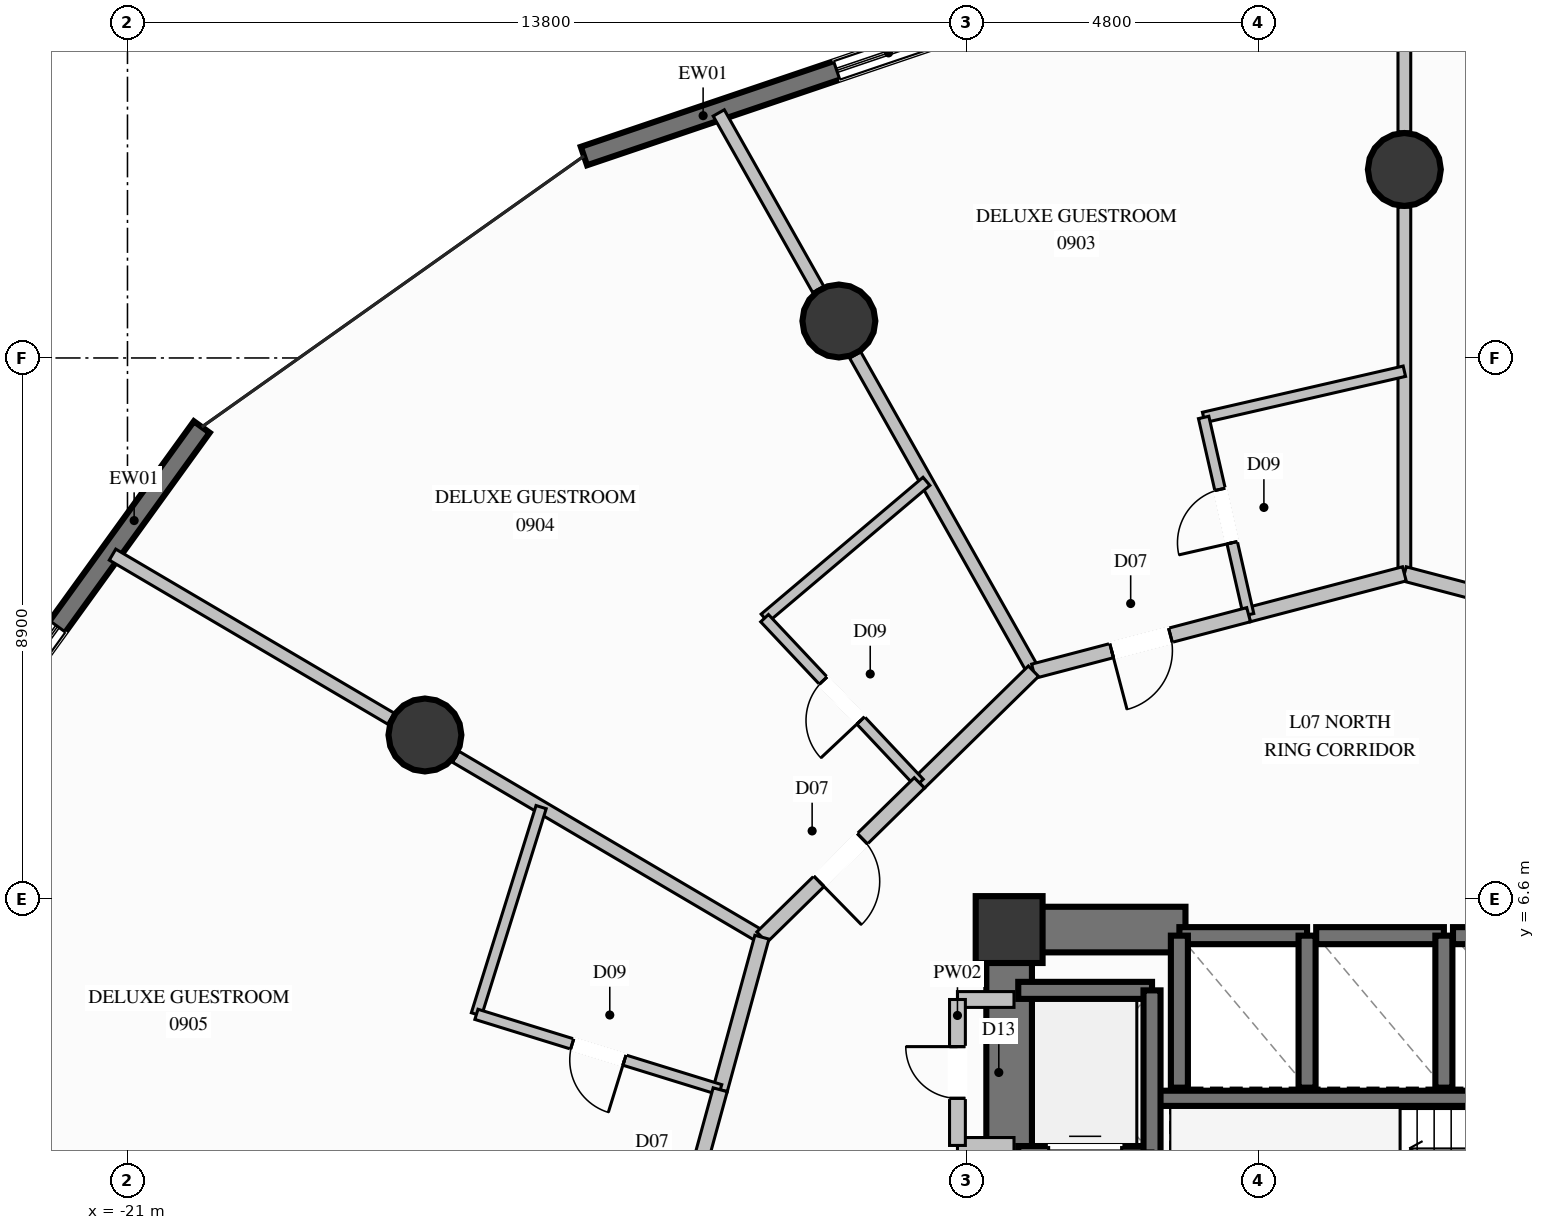
"""IFC4 building model, lengths in metres.
Left out: names, types, materials, properties, quantities, classifications, styles, units other than length and angle.
Written with IfcOpenShell. Run it as: python <this file> out.ifc"""

import sys

from ifc_helpers import new_model, si_unit, direction, frame, frame_2d, origin, origin_2d, place, context, subcontext, project, spatial, rectangle, circle, extrude, element, fill, save


model = new_model("IFC4")
c1 = context("Model", 3, precision=1e-05, world=origin(), true_north=direction((0.0, 1.0)))
c2 = subcontext(c1, "Body", "Model", "MODEL_VIEW")
j1 = project(units=[si_unit("LENGTHUNIT", "METRE"), si_unit("PLANEANGLEUNIT", "RADIAN")], contexts=[c1])
p1 = place(None, origin())
s1 = spatial("IfcSite", under=j1, at=p1, CompositionType="ELEMENT")
p2 = place(p1, origin())
s2 = spatial("IfcBuilding", under=s1, at=p2, CompositionType="ELEMENT")
p3 = place(p2, frame((0.0, 0.0, 35.6)))
s3 = spatial("IfcBuildingStorey", under=s2, at=p3, CompositionType="ELEMENT", Elevation=35.6)
p4 = place(p3, frame((-6.5, 6.1, 0.0), z_axis=(0.0, 0.0, 1.0), x_axis=(1.0, 0.0, 0.0)))
e1 = element("IfcColumn", 1, at=p4, inside=s3, PredefinedType="COLUMN", context=c2, shape_type="SweptSolid", body=[
    extrude(rectangle(XDim=1.1, YDim=1.1, at=origin_2d()), origin(), (0.0, 0.0, 1.0), 3.6),
])
p5 = place(p3, frame((-4.13, 3.325, 0.0), z_axis=(0.0, 0.0, 1.0), x_axis=(1.0, 0.0, 0.0)))
e2 = element("IfcWall", 2, at=p5, inside=s3, PredefinedType="SOLIDWALL", context=c2, shape_type="SweptSolid", body=[
    extrude(rectangle(XDim=8.26, YDim=0.25, at=frame_2d((4.13, 0.0))), origin(), (0.0, 0.0, 1.0), 3.6),
])
p6 = place(p3, frame((-6.125, 6.1, 0.0), z_axis=(0.0, 0.0, 1.0), x_axis=(1.0, 0.0, 0.0)))
e3 = element("IfcWall", 3, at=p6, inside=s3, PredefinedType="SHEAR", context=c2, shape_type="SweptSolid", body=[
    extrude(rectangle(XDim=2.525, YDim=0.75, at=frame_2d((1.262, 0.0))), origin(), (0.0, 0.0, 1.0), 3.6),
])
p7 = place(p3, frame((-6.5, 2.35, 0.0), z_axis=(0.0, 0.0, 1.0), x_axis=(0.0, 1.0, 0.0)))
e4 = element("IfcWall", 4, at=p7, inside=s3, PredefinedType="SHEAR", context=c2, shape_type="SweptSolid", body=[
    extrude(rectangle(XDim=4.125, YDim=0.75, at=frame_2d((2.062, 0.0))), origin(), (0.0, 0.0, 1.0), 3.6),
])
for number, where, z_axis, x_axis in (
    (5, (0.0, 18.6, 0.0), (0.0, 0.0, 1.0), (1.0, 0.0, 0.0)),
    (6, (-9.3, 16.108, 0.0), (0.0, 0.0, 1.0), (1.0, 0.0, 0.0)),
    (7, (-16.108, 9.3, 0.0), (0.0, 0.0, 1.0), (1.0, 0.0, 0.0)),
):
    element("IfcColumn", number, at=place(p3, frame(where, z_axis=z_axis, x_axis=x_axis)), inside=s3, PredefinedType="COLUMN", context=c2, shape_type="SweptSolid", body=[
        extrude(circle(Radius=0.6, at=origin_2d()), origin(), (0.0, 0.0, 1.0), 3.6),
    ])
p8 = place(p3, frame((-13.493, 18.821, 0.0), z_axis=(0.0, 0.0, 1.0), x_axis=(0.94717495877, 0.320717317085, 0.0)))
e8 = element("IfcWall", 8, at=p8, inside=s3, PredefinedType="SOLIDWALL", context=c2, shape_type="SweptSolid", body=[
    extrude(rectangle(XDim=8.151, YDim=0.32, at=frame_2d((4.075, 0.0))), origin(), (0.0, 0.0, 1.0), 3.34),
])
p9 = place(p8, frame((4.389, 0.0, 0.35)))
e9 = element("IfcOpeningElement", 9, at=p9, cuts=e8, PredefinedType="OPENING", context=c2, shape_type="SweptSolid", body=[
    extrude(rectangle(XDim=1.8, YDim=2.6, at=frame_2d((0.9, 1.3))), frame((0.0, 0.17, 0.0), z_axis=(0.0, -1.0, 0.0), x_axis=(1.0, 0.0, 0.0)), (0.0, 0.0, 1.0), 0.34),
])
p10 = place(p3, frame((-24.016, 8.503, 0.0), z_axis=(0.0, 0.0, 1.0), x_axis=(0.585883584877, 0.810395227634, 0.0)))
e10 = element("IfcWall", 10, at=p10, inside=s3, PredefinedType="SOLIDWALL", context=c2, shape_type="SweptSolid", body=[
    extrude(rectangle(XDim=7.234, YDim=0.32, at=frame_2d((3.617, 0.0))), origin(), (0.0, 0.0, 1.0), 3.34),
])
p11 = place(p10, frame((1.386, 0.0, 0.35)))
e11 = element("IfcOpeningElement", 11, at=p11, cuts=e10, PredefinedType="OPENING", context=c2, shape_type="SweptSolid", body=[
    extrude(rectangle(XDim=1.8, YDim=2.6, at=frame_2d((0.9, 1.3))), frame((0.0, 0.17, 0.0), z_axis=(0.0, -1.0, 0.0), x_axis=(1.0, 0.0, 0.0)), (0.0, 0.0, 1.0), 0.34),
])
p12 = place(p3, frame((-1.6, 6.0, 0.0), z_axis=(0.0, 0.0, 1.0), x_axis=(-1.0, 0.0, 0.0)))
e12 = element("IfcWall", 12, at=p12, inside=s3, PredefinedType="SOLIDWALL", context=c2, shape_type="SweptSolid", body=[
    extrude(rectangle(XDim=2.1, YDim=0.28, at=frame_2d((1.05, 0.0))), origin(), (0.0, 0.0, 1.0), 3.34),
])
for number, where, z_axis, x_axis in (
    (13, (-3.7, 6.0, 0.0), (0.0, 0.0, 1.0), (0.0, -1.0, 0.0)),
    (14, (-1.6, 3.5, 0.0), (0.0, 0.0, 1.0), (0.0, 1.0, 0.0)),
):
    element("IfcWall", number, at=place(p3, frame(where, z_axis=z_axis, x_axis=x_axis)), inside=s3, PredefinedType="SOLIDWALL", context=c2, shape_type="SweptSolid", body=[
        extrude(rectangle(XDim=2.5, YDim=0.28, at=frame_2d((1.25, 0.0))), origin(), (0.0, 0.0, 1.0), 3.34),
    ])
p13 = place(p3, frame((0.65, 6.0, 0.0), z_axis=(0.0, 0.0, 1.0), x_axis=(-1.0, 0.0, 0.0)))
e15 = element("IfcWall", 15, at=p13, inside=s3, PredefinedType="SOLIDWALL", context=c2, shape_type="SweptSolid", body=[
    extrude(rectangle(XDim=2.1, YDim=0.28, at=frame_2d((1.05, 0.0))), origin(), (0.0, 0.0, 1.0), 3.34),
])
p14 = place(p3, frame((0.65, 3.5, 0.0), z_axis=(0.0, 0.0, 1.0), x_axis=(0.0, 1.0, 0.0)))
e16 = element("IfcWall", 16, at=p14, inside=s3, PredefinedType="SOLIDWALL", context=c2, shape_type="SweptSolid", body=[
    extrude(rectangle(XDim=2.5, YDim=0.28, at=frame_2d((1.25, 0.0))), origin(), (0.0, 0.0, 1.0), 3.34),
])
p15 = place(p3, frame((3.0, 6.0, 0.0), z_axis=(0.0, 0.0, 1.0), x_axis=(-1.0, 0.0, 0.0)))
e17 = element("IfcWall", 17, at=p15, inside=s3, PredefinedType="SOLIDWALL", context=c2, shape_type="SweptSolid", body=[
    extrude(rectangle(XDim=2.2, YDim=0.28, at=frame_2d((1.1, 0.0))), origin(), (0.0, 0.0, 1.0), 3.34),
])
p16 = place(p3, frame((-6.35, 2.4, 0.0), z_axis=(0.0, 0.0, 1.0), x_axis=(1.0, 0.0, 0.0)))
e18 = element("IfcWall", 18, at=p16, inside=s3, PredefinedType="SOLIDWALL", context=c2, shape_type="SweptSolid", body=[
    extrude(rectangle(XDim=2.2, YDim=0.28, at=frame_2d((1.1, 0.0))), origin(), (0.0, 0.0, 1.0), 3.34),
])
p17 = place(p16, frame((0.5, 0.0, 0.0)))
e19 = element("IfcOpeningElement", 19, at=p17, cuts=e18, PredefinedType="OPENING", context=c2, shape_type="SweptSolid", body=[
    extrude(rectangle(XDim=1.2, YDim=2.2, at=frame_2d((0.6, 1.1))), frame((0.0, 0.15, 0.0), z_axis=(0.0, -1.0, 0.0), x_axis=(1.0, 0.0, 0.0)), (0.0, 0.0, 1.0), 0.3),
])
p18 = place(p3, frame((-4.15, 5.1, 0.0), z_axis=(0.0, 0.0, 1.0), x_axis=(-1.0, 0.0, 0.0)))
e20 = element("IfcWall", 20, at=p18, inside=s3, PredefinedType="SOLIDWALL", context=c2, shape_type="SweptSolid", body=[
    extrude(rectangle(XDim=2.2, YDim=0.28, at=frame_2d((1.1, 0.0))), origin(), (0.0, 0.0, 1.0), 3.34),
])
p19 = place(p3, frame((-4.15, 2.4, 0.0), z_axis=(0.0, 0.0, 1.0), x_axis=(0.0, 1.0, 0.0)))
e21 = element("IfcWall", 21, at=p19, inside=s3, PredefinedType="SOLIDWALL", context=c2, shape_type="SweptSolid", body=[
    extrude(rectangle(XDim=2.7, YDim=0.28, at=frame_2d((1.35, 0.0))), origin(), (0.0, 0.0, 1.0), 3.34),
])
for number, where, z_axis, x_axis in (
    (22, (-7.35, 4.95, 0.0), (0.0, 0.0, 1.0), (1.0, 0.0, 0.0)),
    (23, (-7.35, 2.55, 0.0), (0.0, 0.0, 1.0), (1.0, 0.0, 0.0)),
):
    element("IfcWall", number, at=place(p3, frame(where, z_axis=z_axis, x_axis=x_axis)), inside=s3, PredefinedType="PARTITIONING", context=c2, shape_type="SweptSolid", body=[
        extrude(rectangle(XDim=0.93, YDim=0.26, at=frame_2d((0.465, 0.0))), origin(), (0.0, 0.0, 1.0), 3.34),
    ])
p20 = place(p3, frame((-7.35, 2.55, 0.0), z_axis=(0.0, 0.0, 1.0), x_axis=(0.0, 1.0, 0.0)))
e24 = element("IfcWall", 24, at=p20, inside=s3, PredefinedType="PARTITIONING", context=c2, shape_type="SweptSolid", body=[
    extrude(rectangle(XDim=2.4, YDim=0.26, at=frame_2d((1.2, 0.0))), origin(), (0.0, 0.0, 1.0), 2.425),
])
p21 = place(p20, frame((0.775, 0.0, 0.0)))
e25 = element("IfcOpeningElement", 25, at=p21, cuts=e24, PredefinedType="OPENING", context=c2, shape_type="SweptSolid", body=[
    extrude(rectangle(XDim=0.85, YDim=2.05, at=frame_2d((0.425, 1.025))), frame((0.0, 0.14, 0.0), z_axis=(0.0, -1.0, 0.0), x_axis=(1.0, 0.0, 0.0)), (0.0, 0.0, 1.0), 0.28),
])
p22 = place(p3, frame((0.0, 11.95, 0.0), z_axis=(0.0, 0.0, 1.0), x_axis=(0.0, 1.0, 0.0)))
e26 = element("IfcWall", 26, at=p22, inside=s3, PredefinedType="PARTITIONING", context=c2, shape_type="SweptSolid", body=[
    extrude(rectangle(XDim=6.03, YDim=0.21, at=frame_2d((3.015, 0.0))), origin(), (0.0, 0.0, 1.0), 2.707),
])
p23 = place(p3, frame((0.0, 19.22, 0.0), z_axis=(0.0, 0.0, 1.0), x_axis=(0.0, 1.0, 0.0)))
e27 = element("IfcWall", 27, at=p23, inside=s3, PredefinedType="PARTITIONING", context=c2, shape_type="SweptSolid", body=[
    extrude(rectangle(XDim=2.53, YDim=0.21, at=frame_2d((1.265, 0.0))), origin(), (0.0, 0.0, 1.0), 3.34),
])
p24 = place(p3, frame((-6.1, 10.349, 0.0), z_axis=(0.0, 0.0, 1.0), x_axis=(-0.491140594116, 0.871080315936, 0.0)))
e28 = element("IfcWall", 28, at=p24, inside=s3, PredefinedType="PARTITIONING", context=c2, shape_type="SweptSolid", body=[
    extrude(rectangle(XDim=5.969, YDim=0.21, at=frame_2d((2.985, 0.0))), origin(), (0.0, 0.0, 1.0), 2.707),
])
p25 = place(p3, frame((-9.639, 16.627, 0.0), z_axis=(0.0, 0.0, 1.0), x_axis=(-0.491168715891, 0.871064459457, 0.0)))
e29 = element("IfcWall", 29, at=p25, inside=s3, PredefinedType="PARTITIONING", context=c2, shape_type="SweptSolid", body=[
    extrude(rectangle(XDim=3.333, YDim=0.21, at=frame_2d((1.667, 0.0))), origin(), (0.0, 0.0, 1.0), 3.34),
])
p26 = place(p3, frame((-10.566, 5.975, 0.0), z_axis=(0.0, 0.0, 1.0), x_axis=(-0.86160761681, 0.507574935014, 0.0)))
e30 = element("IfcWall", 30, at=p26, inside=s3, PredefinedType="PARTITIONING", context=c2, shape_type="SweptSolid", body=[
    extrude(rectangle(XDim=5.845, YDim=0.21, at=frame_2d((2.922, 0.0))), origin(), (0.0, 0.0, 1.0), 2.707),
])
p27 = place(p3, frame((-16.667, 9.569, 0.0), z_axis=(0.0, 0.0, 1.0), x_axis=(-0.861651827739, 0.50749987956, 0.0)))
e31 = element("IfcWall", 31, at=p27, inside=s3, PredefinedType="PARTITIONING", context=c2, shape_type="SweptSolid", body=[
    extrude(rectangle(XDim=5.314, YDim=0.21, at=frame_2d((2.657, 0.0))), origin(), (0.0, 0.0, 1.0), 3.34),
])
p28 = place(p3, frame((3.538, 11.021, 0.0), z_axis=(0.0, 0.0, 1.0), x_axis=(-0.96721703222, 0.253951201187, 0.0)))
e32 = element("IfcWall", 32, at=p28, inside=s3, PredefinedType="PARTITIONING", context=c2, shape_type="SweptSolid", body=[
    extrude(rectangle(XDim=3.658, YDim=0.24, at=frame_2d((1.829, 0.0))), origin(), (0.0, 0.0, 1.0), 2.917),
])
p29 = place(p28, frame((1.329, 0.0, 0.0)))
e33 = element("IfcOpeningElement", 33, at=p29, cuts=e32, PredefinedType="OPENING", context=c2, shape_type="SweptSolid", body=[
    extrude(rectangle(XDim=1.0, YDim=2.2, at=frame_2d((0.5, 1.1))), frame((0.0, 0.13, 0.0), z_axis=(0.0, -1.0, 0.0), x_axis=(1.0, 0.0, 0.0)), (0.0, 0.0, 1.0), 0.26),
])
p30 = place(p3, frame((0.0, 11.95, 0.0), z_axis=(0.0, 0.0, 1.0), x_axis=(-0.967291490053, -0.253667446219, 0.0)))
e34 = element("IfcWall", 34, at=p30, inside=s3, PredefinedType="PARTITIONING", context=c2, shape_type="SweptSolid", body=[
    extrude(rectangle(XDim=2.649, YDim=0.24, at=frame_2d((1.324, 0.0))), origin(), (0.0, 0.0, 1.0), 2.917),
])
p31 = place(p3, frame((0.0, 15.282, 0.0), z_axis=(0.0, 0.0, 1.0), x_axis=(-0.974505253862, -0.224364681257, 0.0)))
e35 = element("IfcWall", 35, at=p31, inside=s3, PredefinedType="PLUMBINGWALL", context=c2, shape_type="SweptSolid", body=[
    extrude(rectangle(XDim=3.387, YDim=0.175, at=frame_2d((1.694, 0.0))), origin(), (0.0, 0.0, 1.0), 3.34),
])
p32 = place(p3, frame((-2.562, 11.278, 0.0), z_axis=(0.0, 0.0, 1.0), x_axis=(-0.222125372562, 0.97501811207, 0.0)))
e36 = element("IfcWall", 36, at=p32, inside=s3, PredefinedType="PLUMBINGWALL", context=c2, shape_type="SweptSolid", body=[
    extrude(rectangle(XDim=3.327, YDim=0.175, at=frame_2d((1.664, 0.0))), origin(), (0.0, 0.0, 1.0), 3.34),
])
p33 = place(p32, frame((1.214, 0.0, 0.0)))
e37 = element("IfcOpeningElement", 37, at=p33, cuts=e36, PredefinedType="OPENING", context=c2, shape_type="SweptSolid", body=[
    extrude(rectangle(XDim=0.9, YDim=2.1, at=frame_2d((0.45, 1.05))), frame((0.0, 0.098, 0.0), z_axis=(0.0, -1.0, 0.0), x_axis=(1.0, 0.0, 0.0)), (0.0, 0.0, 1.0), 0.195),
])
p34 = place(p3, frame((-2.562, 11.278, 0.0), z_axis=(0.0, 0.0, 1.0), x_axis=(-0.96721703222, -0.253951201187, 0.0)))
e38 = element("IfcWall", 38, at=p34, inside=s3, PredefinedType="PARTITIONING", context=c2, shape_type="SweptSolid", body=[
    extrude(rectangle(XDim=3.658, YDim=0.24, at=frame_2d((1.829, 0.0))), origin(), (0.0, 0.0, 1.0), 2.917),
])
p35 = place(p34, frame((1.329, 0.0, 0.0)))
e39 = element("IfcOpeningElement", 39, at=p35, cuts=e38, PredefinedType="OPENING", context=c2, shape_type="SweptSolid", body=[
    extrude(rectangle(XDim=1.0, YDim=2.2, at=frame_2d((0.5, 1.1))), frame((0.0, 0.13, 0.0), z_axis=(0.0, -1.0, 0.0), x_axis=(1.0, 0.0, 0.0)), (0.0, 0.0, 1.0), 0.26),
])
p36 = place(p3, frame((-6.1, 10.349, 0.0), z_axis=(0.0, 0.0, 1.0), x_axis=(-0.714460071513, -0.69967621527, 0.0)))
e40 = element("IfcWall", 40, at=p36, inside=s3, PredefinedType="PARTITIONING", context=c2, shape_type="SweptSolid", body=[
    extrude(rectangle(XDim=2.626, YDim=0.24, at=frame_2d((1.313, 0.0))), origin(), (0.0, 0.0, 1.0), 3.34),
])
p37 = place(p3, frame((-7.86, 13.471, 0.0), z_axis=(0.0, 0.0, 1.0), x_axis=(-0.763718302061, -0.645549653471, 0.0)))
e41 = element("IfcWall", 41, at=p37, inside=s3, PredefinedType="PLUMBINGWALL", context=c2, shape_type="SweptSolid", body=[
    extrude(rectangle(XDim=3.485, YDim=0.175, at=frame_2d((1.743, 0.0))), origin(), (0.0, 0.0, 1.0), 3.34),
])
p38 = place(p3, frame((-7.976, 8.512, 0.0), z_axis=(0.0, 0.0, 1.0), x_axis=(-0.684831906404, 0.72870107724, 0.0)))
e42 = element("IfcWall", 42, at=p38, inside=s3, PredefinedType="PLUMBINGWALL", context=c2, shape_type="SweptSolid", body=[
    extrude(rectangle(XDim=3.718, YDim=0.175, at=frame_2d((1.859, 0.0))), origin(), (0.0, 0.0, 1.0), 3.34),
])
p39 = place(p38, frame((1.409, 0.0, 0.0)))
e43 = element("IfcOpeningElement", 43, at=p39, cuts=e42, PredefinedType="OPENING", context=c2, shape_type="SweptSolid", body=[
    extrude(rectangle(XDim=0.9, YDim=2.1, at=frame_2d((0.45, 1.05))), frame((0.0, 0.098, 0.0), z_axis=(0.0, -1.0, 0.0), x_axis=(1.0, 0.0, 0.0)), (0.0, 0.0, 1.0), 0.195),
])
p40 = place(p3, frame((-7.976, 8.512, 0.0), z_axis=(0.0, 0.0, 1.0), x_axis=(-0.714375756875, -0.699762301064, 0.0)))
e44 = element("IfcWall", 44, at=p40, inside=s3, PredefinedType="PARTITIONING", context=c2, shape_type="SweptSolid", body=[
    extrude(rectangle(XDim=3.625, YDim=0.24, at=frame_2d((1.812, 0.0))), origin(), (0.0, 0.0, 1.0), 3.34),
])
p41 = place(p40, frame((1.313, 0.0, 0.0)))
e45 = element("IfcOpeningElement", 45, at=p41, cuts=e44, PredefinedType="OPENING", context=c2, shape_type="SweptSolid", body=[
    extrude(rectangle(XDim=1.0, YDim=2.2, at=frame_2d((0.5, 1.1))), frame((0.0, 0.13, 0.0), z_axis=(0.0, -1.0, 0.0), x_axis=(1.0, 0.0, 0.0)), (0.0, 0.0, 1.0), 0.26),
])
p42 = place(p3, frame((-10.566, 5.975, 0.0), z_axis=(0.0, 0.0, 1.0), x_axis=(-0.263744763784, -0.964592504416, 0.0)))
e46 = element("IfcWall", 46, at=p42, inside=s3, PredefinedType="PARTITIONING", context=c2, shape_type="SweptSolid", body=[
    extrude(rectangle(XDim=2.601, YDim=0.24, at=frame_2d((1.301, 0.0))), origin(), (0.0, 0.0, 1.0), 3.34),
])
p43 = place(p3, frame((-14.197, 8.114, 0.0), z_axis=(0.0, 0.0, 1.0), x_axis=(-0.298014103634, -0.954561466871, 0.0)))
e47 = element("IfcWall", 47, at=p43, inside=s3, PredefinedType="PLUMBINGWALL", context=c2, shape_type="SweptSolid", body=[
    extrude(rectangle(XDim=3.57, YDim=0.175, at=frame_2d((1.785, 0.0))), origin(), (0.0, 0.0, 1.0), 3.34),
])
p44 = place(p3, frame((-11.252, 3.466, 0.0), z_axis=(0.0, 0.0, 1.0), x_axis=(-0.955346516927, 0.295487787557, 0.0)))
e48 = element("IfcWall", 48, at=p44, inside=s3, PredefinedType="PLUMBINGWALL", context=c2, shape_type="SweptSolid", body=[
    extrude(rectangle(XDim=4.197, YDim=0.175, at=frame_2d((2.098, 0.0))), origin(), (0.0, 0.0, 1.0), 3.34),
])
p45 = place(p44, frame((1.648, 0.0, 0.0)))
e49 = element("IfcOpeningElement", 49, at=p45, cuts=e48, PredefinedType="OPENING", context=c2, shape_type="SweptSolid", body=[
    extrude(rectangle(XDim=0.9, YDim=2.1, at=frame_2d((0.45, 1.05))), frame((0.0, 0.098, 0.0), z_axis=(0.0, -1.0, 0.0), x_axis=(1.0, 0.0, 0.0)), (0.0, 0.0, 1.0), 0.195),
])
p46 = place(p3, frame((-11.252, 3.466, 0.0), z_axis=(0.0, 0.0, 1.0), x_axis=(-0.263818706543, -0.96457228349, 0.0)))
e50 = element("IfcWall", 50, at=p46, inside=s3, PredefinedType="PARTITIONING", context=c2, shape_type="SweptSolid", body=[
    extrude(rectangle(XDim=3.593, YDim=0.24, at=frame_2d((1.797, 0.0))), origin(), (0.0, 0.0, 1.0), 3.34),
])
p47 = place(p46, frame((1.297, 0.0, 0.0)))
e51 = element("IfcOpeningElement", 51, at=p47, cuts=e50, PredefinedType="OPENING", context=c2, shape_type="SweptSolid", body=[
    extrude(rectangle(XDim=1.0, YDim=2.2, at=frame_2d((0.5, 1.1))), frame((0.0, 0.13, 0.0), z_axis=(0.0, -1.0, 0.0), x_axis=(1.0, 0.0, 0.0)), (0.0, 0.0, 1.0), 0.26),
])
p48 = place(p9, origin())
e52 = element("IfcWindow", 52, at=p48, inside=s3, PartitioningType="SINGLE_PANEL", PredefinedType="WINDOW", context=c2, shape_type="SweptSolid", body=[
    extrude(rectangle(XDim=1.8, YDim=2.6, at=frame_2d((0.9, 1.3))), frame((0.0, 0.03, 0.0), z_axis=(0.0, -1.0, 0.0), x_axis=(1.0, 0.0, 0.0)), (0.0, 0.0, 1.0), 0.06),
])
fill(e9, e52)
p49 = place(p11, origin())
e53 = element("IfcWindow", 53, at=p49, inside=s3, PartitioningType="SINGLE_PANEL", PredefinedType="WINDOW", context=c2, shape_type="SweptSolid", body=[
    extrude(rectangle(XDim=1.8, YDim=2.6, at=frame_2d((0.9, 1.3))), frame((0.0, 0.03, 0.0), z_axis=(0.0, -1.0, 0.0), x_axis=(1.0, 0.0, 0.0)), (0.0, 0.0, 1.0), 0.06),
])
fill(e11, e53)
p50 = place(p21, origin())
e54 = element("IfcDoor", 54, at=p50, inside=s3, OperationType="SINGLE_SWING_RIGHT", PredefinedType="DOOR", context=c2, shape_type="SweptSolid", body=[
    extrude(rectangle(XDim=0.85, YDim=2.05, at=frame_2d((0.425, 1.025))), frame((0.0, 0.025, 0.0), z_axis=(0.0, -1.0, 0.0), x_axis=(1.0, 0.0, 0.0)), (0.0, 0.0, 1.0), 0.05),
])
fill(e25, e54)
p51 = place(p33, origin())
e55 = element("IfcDoor", 55, at=p51, inside=s3, OperationType="SINGLE_SWING_LEFT", PredefinedType="DOOR", context=c2, shape_type="SweptSolid", body=[
    extrude(rectangle(XDim=0.9, YDim=2.1, at=frame_2d((0.45, 1.05))), frame((0.0, 0.025, 0.0), z_axis=(0.0, -1.0, 0.0), x_axis=(1.0, 0.0, 0.0)), (0.0, 0.0, 1.0), 0.05),
])
fill(e37, e55)
p52 = place(p35, origin())
e56 = element("IfcDoor", 56, at=p52, inside=s3, OperationType="SINGLE_SWING_RIGHT", PredefinedType="DOOR", context=c2, shape_type="SweptSolid", body=[
    extrude(rectangle(XDim=1.0, YDim=2.2, at=frame_2d((0.5, 1.1))), frame((0.0, 0.025, 0.0), z_axis=(0.0, -1.0, 0.0), x_axis=(1.0, 0.0, 0.0)), (0.0, 0.0, 1.0), 0.05),
])
fill(e39, e56)
p53 = place(p39, origin())
e57 = element("IfcDoor", 57, at=p53, inside=s3, OperationType="SINGLE_SWING_LEFT", PredefinedType="DOOR", context=c2, shape_type="SweptSolid", body=[
    extrude(rectangle(XDim=0.9, YDim=2.1, at=frame_2d((0.45, 1.05))), frame((0.0, 0.025, 0.0), z_axis=(0.0, -1.0, 0.0), x_axis=(1.0, 0.0, 0.0)), (0.0, 0.0, 1.0), 0.05),
])
fill(e43, e57)
p54 = place(p41, origin())
e58 = element("IfcDoor", 58, at=p54, inside=s3, OperationType="SINGLE_SWING_RIGHT", PredefinedType="DOOR", context=c2, shape_type="SweptSolid", body=[
    extrude(rectangle(XDim=1.0, YDim=2.2, at=frame_2d((0.5, 1.1))), frame((0.0, 0.025, 0.0), z_axis=(0.0, -1.0, 0.0), x_axis=(1.0, 0.0, 0.0)), (0.0, 0.0, 1.0), 0.05),
])
fill(e45, e58)
p55 = place(p45, origin())
e59 = element("IfcDoor", 59, at=p55, inside=s3, OperationType="SINGLE_SWING_LEFT", PredefinedType="DOOR", context=c2, shape_type="SweptSolid", body=[
    extrude(rectangle(XDim=0.9, YDim=2.1, at=frame_2d((0.45, 1.05))), frame((0.0, 0.025, 0.0), z_axis=(0.0, -1.0, 0.0), x_axis=(1.0, 0.0, 0.0)), (0.0, 0.0, 1.0), 0.05),
])
fill(e49, e59)
save(model, sys.argv[1])
